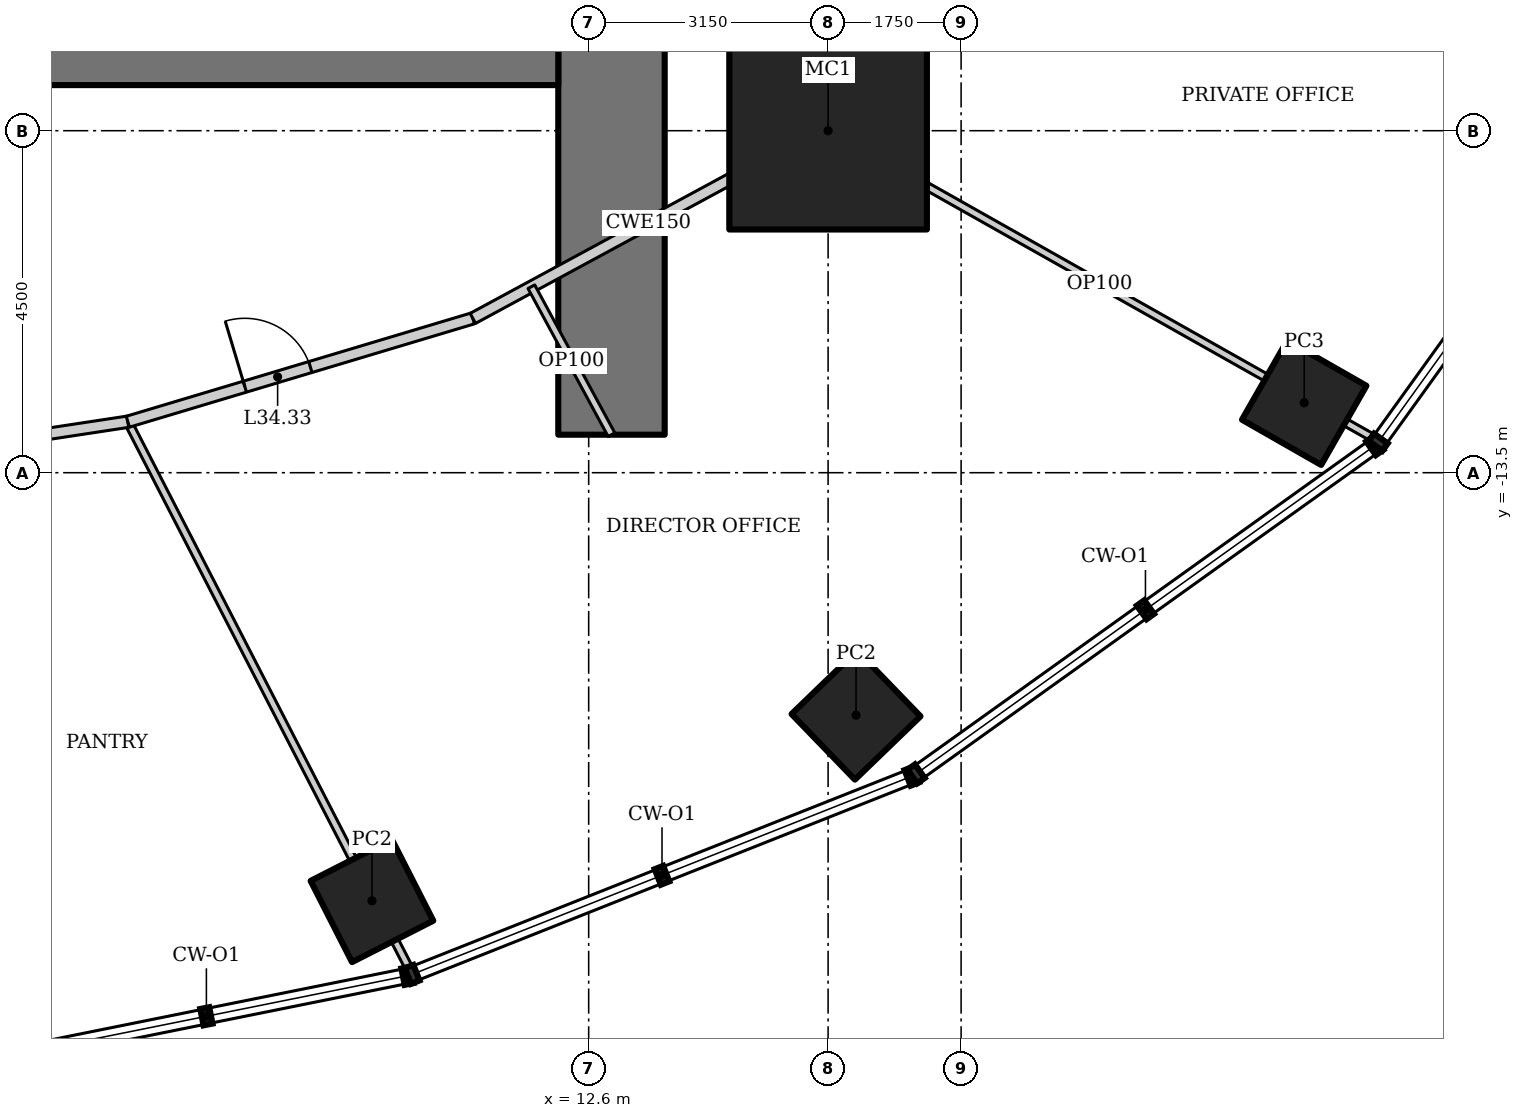
"""IFC4 building model, lengths in metres.
Left out: names, types, materials, properties, quantities, classifications, styles, units other than length and angle.
Written with IfcOpenShell. Run it as: python <this file> out.ifc"""

import sys

from ifc_helpers import new_model, si_unit, direction, frame, frame_2d, origin, origin_2d, place, context, subcontext, project, spatial, rectangle, hollow_rectangle, extrude, element, fill, save


model = new_model("IFC4")
c1 = context("Model", 3, precision=1e-05, world=origin(), true_north=direction((0.0, 1.0)))
c2 = subcontext(c1, "Body", "Model", "MODEL_VIEW")
j1 = project(units=[si_unit("LENGTHUNIT", "METRE"), si_unit("PLANEANGLEUNIT", "RADIAN")], contexts=[c1])
p1 = place(None, origin())
s1 = spatial("IfcSite", under=j1, at=p1, CompositionType="ELEMENT")
p2 = place(p1, origin())
s2 = spatial("IfcBuilding", under=s1, at=p2, CompositionType="ELEMENT")
p3 = place(p2, frame((0.0, 0.0, 146.8)))
s3 = spatial("IfcBuildingStorey", under=s2, at=p3, CompositionType="ELEMENT", Elevation=146.8)
p4 = place(p3, frame((15.75, -9.0, 0.0), z_axis=(0.0, 0.0, 1.0), x_axis=(1.0, 0.0, 0.0)))
e1 = element("IfcColumn", 1, at=p4, inside=s3, PredefinedType="COLUMN", context=c2, shape_type="SweptSolid", body=[
    extrude(hollow_rectangle(XDim=2.6, YDim=2.6, WallThickness=0.13, at=origin_2d()), origin(), (0.0, 0.0, 1.0), 4.2),
])
for number, where, z_axis, x_axis in (
    (2, (9.749, -19.133, 0.0), (0.0, 0.0, 1.0), (0.891, 0.454, 0.0)),
    (3, (16.118, -16.69, 0.0), (0.0, 0.0, 1.0), (0.719, 0.695, 0.0)),
):
    element("IfcColumn", number, at=place(p3, frame(where, z_axis=z_axis, x_axis=x_axis)), inside=s3, PredefinedType="COLUMN", context=c2, shape_type="SweptSolid", body=[
        extrude(hollow_rectangle(XDim=1.2, YDim=1.2, WallThickness=0.1, at=origin_2d()), origin(), (0.0, 0.0, 1.0), 4.2),
    ])
p5 = place(p3, frame((22.014, -12.579, 0.0), z_axis=(0.0, 0.0, 1.0), x_axis=(0.496139221777, 0.86824298017, 0.0)))
e4 = element("IfcColumn", 4, at=p5, inside=s3, PredefinedType="COLUMN", context=c2, shape_type="SweptSolid", body=[
    extrude(hollow_rectangle(XDim=1.2, YDim=1.2, WallThickness=0.12, at=origin_2d()), origin(), (0.0, 0.0, 1.0), 4.2),
])
p6 = place(p3, frame((12.9, -13.0, 0.0), z_axis=(0.0, 0.0, 1.0), x_axis=(0.0, 1.0, 0.0)))
e5 = element("IfcWall", 5, at=p6, inside=s3, PredefinedType="SHEAR", context=c2, shape_type="SweptSolid", body=[
    extrude(rectangle(XDim=26.0, YDim=1.4, at=frame_2d((13.0, 0.0))), origin(), (0.0, 0.0, 1.0), 4.2),
])
p7 = place(p6, frame((12.1, 0.0, 0.0)))
e6 = element("IfcOpeningElement", 6, at=p7, cuts=e5, PredefinedType="OPENING", context=c2, shape_type="SweptSolid", body=[
    extrude(rectangle(XDim=1.8, YDim=2.1, at=frame_2d((0.9, 1.05))), frame((0.0, 0.71, 0.0), z_axis=(0.0, -1.0, 0.0), x_axis=(1.0, 0.0, 0.0)), (0.0, 0.0, 1.0), 1.42),
])
p8 = place(p3, frame((-12.2, -7.6, 0.0), z_axis=(0.0, 0.0, 1.0), x_axis=(1.0, 0.0, 0.0)))
e7 = element("IfcWall", 7, at=p8, inside=s3, PredefinedType="SHEAR", context=c2, shape_type="SweptSolid", body=[
    extrude(rectangle(XDim=24.4, YDim=1.6, at=frame_2d((12.2, 0.0))), origin(), (0.0, 0.0, 1.0), 4.2),
])
p9 = place(p3, frame((10.253, -20.052, 0.0), z_axis=(0.0, 0.0, 1.0), x_axis=(-0.457535449567, 0.889191381194, 0.0)))
e8 = element("IfcWall", 8, at=p9, inside=s3, PredefinedType="PARTITIONING", context=c2, shape_type="SweptSolid", body=[
    extrude(rectangle(XDim=8.123, YDim=0.1, at=frame_2d((4.061, 0.0))), origin(), (0.0, 0.0, 1.0), 3.349),
])
p10 = place(p3, frame((22.949, -13.059, 0.0), z_axis=(0.0, 0.0, 1.0), x_axis=(-0.871079462611, 0.491142107558, 0.0)))
e9 = element("IfcWall", 9, at=p10, inside=s3, PredefinedType="PARTITIONING", context=c2, shape_type="SweptSolid", body=[
    extrude(rectangle(XDim=8.327, YDim=0.1, at=frame_2d((4.164, 0.0))), origin(), (0.0, 0.0, 1.0), 3.45),
])
p11 = place(p3, frame((3.083, -13.354, 0.0), z_axis=(0.0, 0.0, 1.0), x_axis=(0.988668719464, 0.150113833987, 0.0)))
e10 = element("IfcWall", 10, at=p11, inside=s3, PredefinedType="PARTITIONING", context=c2, shape_type="SweptSolid", body=[
    extrude(rectangle(XDim=3.493, YDim=0.15, at=frame_2d((1.747, 0.0))), origin(), (0.0, 0.0, 1.0), 4.05),
])
p12 = place(p11, frame((0.15, 0.0, 0.0)))
e11 = element("IfcOpeningElement", 11, at=p12, cuts=e10, PredefinedType="OPENING", context=c2, shape_type="SweptSolid", body=[
    extrude(rectangle(XDim=0.9, YDim=2.1, at=frame_2d((0.45, 1.05))), frame((0.0, 0.085, 0.0), z_axis=(0.0, -1.0, 0.0), x_axis=(1.0, 0.0, 0.0)), (0.0, 0.0, 1.0), 0.17),
])
p13 = place(p3, frame((6.537, -12.829, 0.0), z_axis=(0.0, 0.0, 1.0), x_axis=(0.957933992798, 0.286988615527, 0.0)))
e12 = element("IfcWall", 12, at=p13, inside=s3, PredefinedType="PARTITIONING", context=c2, shape_type="SweptSolid", body=[
    extrude(rectangle(XDim=4.738, YDim=0.15, at=frame_2d((2.369, 0.0))), origin(), (0.0, 0.0, 1.0), 4.05),
])
p14 = place(p13, frame((1.607, 0.0, 0.0)))
e13 = element("IfcOpeningElement", 13, at=p14, cuts=e12, PredefinedType="OPENING", context=c2, shape_type="SweptSolid", body=[
    extrude(rectangle(XDim=0.9, YDim=2.1, at=frame_2d((0.45, 1.05))), frame((0.0, 0.085, 0.0), z_axis=(0.0, -1.0, 0.0), x_axis=(1.0, 0.0, 0.0)), (0.0, 0.0, 1.0), 0.17),
])
p15 = place(p3, frame((11.076, -11.469, 0.0), z_axis=(0.0, 0.0, 1.0), x_axis=(0.879436285334, 0.476016617397, 0.0)))
e14 = element("IfcWall", 14, at=p15, inside=s3, PredefinedType="PARTITIONING", context=c2, shape_type="SweptSolid", body=[
    extrude(rectangle(XDim=5.253, YDim=0.15, at=frame_2d((2.626, 0.0))), origin(), (0.0, 0.0, 1.0), 4.05),
])
p16 = place(p3, frame((15.696, -8.969, 0.0), z_axis=(0.0, 0.0, 1.0), x_axis=(0.688797257101, 0.72495402517, 0.0)))
e15 = element("IfcWall", 15, at=p16, inside=s3, PredefinedType="PARTITIONING", context=c2, shape_type="SweptSolid", body=[
    extrude(rectangle(XDim=5.638, YDim=0.15, at=frame_2d((2.819, 0.0))), origin(), (0.0, 0.0, 1.0), 4.05),
])
p17 = place(p16, frame((4.588, 0.0, 0.0)))
e16 = element("IfcOpeningElement", 16, at=p17, cuts=e15, PredefinedType="OPENING", context=c2, shape_type="SweptSolid", body=[
    extrude(rectangle(XDim=0.9, YDim=2.1, at=frame_2d((0.45, 1.05))), frame((0.0, 0.085, 0.0), z_axis=(0.0, -1.0, 0.0), x_axis=(1.0, 0.0, 0.0)), (0.0, 0.0, 1.0), 0.17),
])
p18 = place(p3, frame((12.9, -13.0, 0.0), z_axis=(0.0, 0.0, 1.0), x_axis=(-0.475998959765, 0.879445842734, 0.0)))
e17 = element("IfcWall", 17, at=p18, inside=s3, PredefinedType="PARTITIONING", context=c2, shape_type="SweptSolid", body=[
    extrude(rectangle(XDim=2.214, YDim=0.1, at=frame_2d((1.107, 0.0))), origin(), (0.0, 0.0, 1.0), 4.05),
])
p19 = place(p14, origin())
e18 = element("IfcDoor", 18, at=p19, inside=s3, OperationType="SINGLE_SWING_LEFT", PredefinedType="DOOR", context=c2, shape_type="SweptSolid", body=[
    extrude(rectangle(XDim=0.9, YDim=2.1, at=frame_2d((0.45, 1.05))), frame((0.0, 0.025, 0.0), z_axis=(0.0, -1.0, 0.0), x_axis=(1.0, 0.0, 0.0)), (0.0, 0.0, 1.0), 0.05),
])
fill(e13, e18)
save(model, sys.argv[1])
